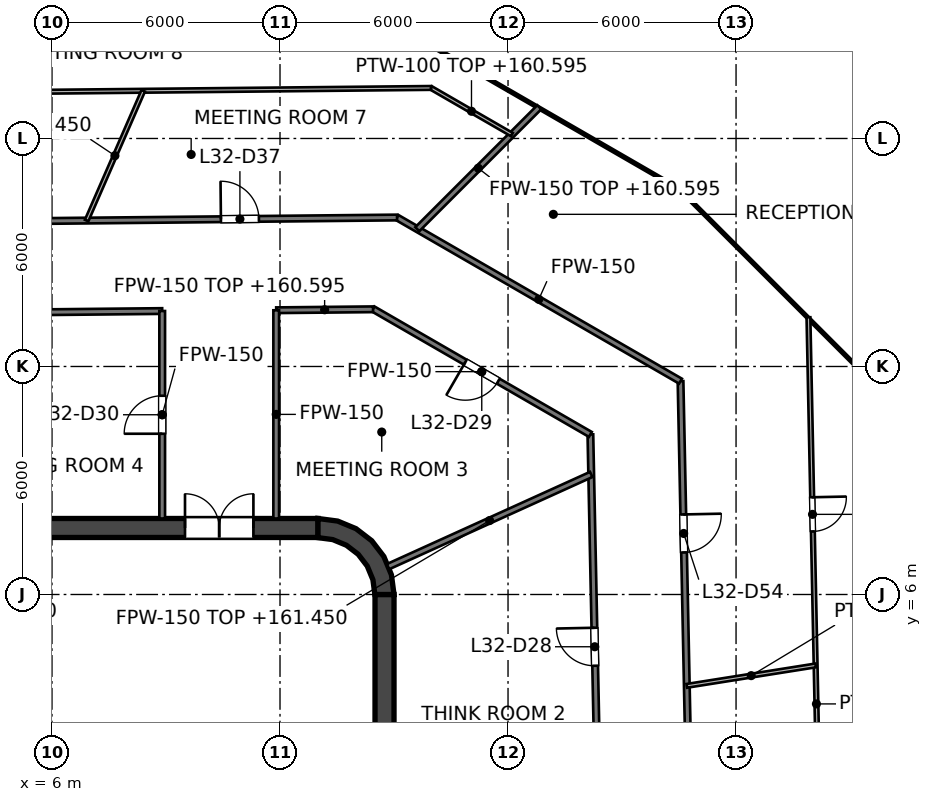
"""IFC4 building model, lengths in metres.
Left out: names, types, materials, properties, quantities, classifications, styles, units other than length and angle.
Written with IfcOpenShell. Run it as: python <this file> out.ifc"""

import sys

from ifc_helpers import new_model, si_unit, direction, frame, frame_2d, origin, place, context, subcontext, project, spatial, polyline, rectangle, outline, extrude, element, fill, save


model = new_model("IFC4")
c1 = context("Model", 3, precision=1e-05, world=origin(), true_north=direction((0.0, 1.0)))
c2 = subcontext(c1, "Body", "Model", "MODEL_VIEW")
j1 = project(units=[si_unit("LENGTHUNIT", "METRE"), si_unit("PLANEANGLEUNIT", "RADIAN")], contexts=[c1])
p1 = place(None, origin())
s1 = spatial("IfcSite", under=j1, at=p1, CompositionType="ELEMENT")
p2 = place(p1, origin())
s2 = spatial("IfcBuilding", under=s1, at=p2, CompositionType="ELEMENT")
p3 = place(p2, frame((0.0, 0.0, 157.6)))
s3 = spatial("IfcBuildingStorey", under=s2, at=p3, CompositionType="ELEMENT", Elevation=157.6)
p4 = place(p3, frame((-13.0, 7.75, 0.0), z_axis=(0.0, 0.0, 1.0), x_axis=(1.0, 0.0, 0.0)))
e1 = element("IfcWall", 1, at=p4, inside=s3, PredefinedType="SHEAR", context=c2, shape_type="SweptSolid", body=[
    extrude(rectangle(XDim=26.0, YDim=0.5, at=frame_2d((13.0, 0.0))), origin(), (0.0, 0.0, 1.0), 4.0),
])
p5 = place(p4, frame((1.7, 0.0, 0.0)))
e2 = element("IfcOpeningElement", 2, at=p5, cuts=e1, PredefinedType="OPENING", context=c2, shape_type="SweptSolid", body=[
    extrude(rectangle(XDim=1.8, YDim=2.1, at=frame_2d((0.9, 1.05))), frame((0.0, 0.25, 0.0), z_axis=(0.0, -1.0, 0.0), x_axis=(1.0, 0.0, 0.0)), (0.0, 0.0, 1.0), 0.5),
])
p6 = place(p4, frame((22.5, 0.0, 0.0)))
e3 = element("IfcOpeningElement", 3, at=p6, cuts=e1, PredefinedType="OPENING", context=c2, shape_type="SweptSolid", body=[
    extrude(rectangle(XDim=1.8, YDim=2.1, at=frame_2d((0.9, 1.05))), frame((0.0, 0.25, 0.0), z_axis=(0.0, -1.0, 0.0), x_axis=(1.0, 0.0, 0.0)), (0.0, 0.0, 1.0), 0.5),
])
p7 = place(p3, frame((14.75, -6.0, 0.0), z_axis=(0.0, 0.0, 1.0), x_axis=(0.0, 1.0, 0.0)))
e4 = element("IfcWall", 4, at=p7, inside=s3, PredefinedType="SHEAR", context=c2, shape_type="SweptSolid", body=[
    extrude(rectangle(XDim=12.0, YDim=0.5, at=frame_2d((6.0, 0.0))), origin(), (0.0, 0.0, 1.0), 4.0),
])
p8 = place(p3, origin())
e5 = element("IfcWall", 5, at=p8, inside=s3, PredefinedType="SHEAR", context=c2, shape_type="SweptSolid", body=[
    extrude(outline(polyline([(13.0, 8.0), (13.0, 7.496), (13.387, 7.445), (13.748, 7.295), (14.058, 7.058), (14.295, 6.748), (14.445, 6.387), (14.496, 6.0), (15.0, 6.0), (14.932, 6.518), (14.732, 7.0), (14.414, 7.414), (14.0, 7.732), (13.518, 7.932), (13.0, 8.0)])), origin(), (0.0, 0.0, 1.0), 4.0),
])
p9 = place(p3, frame((9.0, 4.1, 0.0), z_axis=(0.0, 0.0, 1.0), x_axis=(0.0, 1.0, 0.0)))
e6 = element("IfcWall", 6, at=p9, inside=s3, PredefinedType="SOLIDWALL", context=c2, shape_type="SweptSolid", body=[
    extrude(rectangle(XDim=2.5, YDim=0.25, at=frame_2d((1.25, 0.0))), origin(), (0.0, 0.0, 1.0), 3.85),
])
p10 = place(p9, frame((0.65, 0.0, 0.0)))
e7 = element("IfcOpeningElement", 7, at=p10, cuts=e6, PredefinedType="OPENING", context=c2, shape_type="SweptSolid", body=[
    extrude(rectangle(XDim=1.2, YDim=2.1, at=frame_2d((0.6, 1.05))), frame((0.0, 0.125, 0.0), z_axis=(0.0, -1.0, 0.0), x_axis=(1.0, 0.0, 0.0)), (0.0, 0.0, 1.0), 0.25),
])
p11 = place(p3, frame((-9.125, 7.05, 0.0), z_axis=(0.0, 0.0, 1.0), x_axis=(1.0, 0.0, 0.0)))
e8 = element("IfcWall", 8, at=p11, inside=s3, PredefinedType="SOLIDWALL", context=c2, shape_type="SweptSolid", body=[
    extrude(rectangle(XDim=18.25, YDim=0.9, at=frame_2d((9.125, 0.0))), origin(), (0.0, 0.0, 1.0), 3.85),
])
p12 = place(p3, frame((0.775, 3.975, 0.0), z_axis=(0.0, 0.0, 1.0), x_axis=(1.0, 0.0, 0.0)))
e9 = element("IfcWall", 9, at=p12, inside=s3, PredefinedType="SOLIDWALL", context=c2, shape_type="SweptSolid", body=[
    extrude(rectangle(XDim=8.35, YDim=0.25, at=frame_2d((4.175, 0.0))), origin(), (0.0, 0.0, 1.0), 3.85),
])
p13 = place(p3, frame((9.0, 1.65, 0.0), z_axis=(0.0, 0.0, 1.0), x_axis=(0.0, 1.0, 0.0)))
e10 = element("IfcWall", 10, at=p13, inside=s3, PredefinedType="PARTITIONING", context=c2, shape_type="SweptSolid", body=[
    extrude(rectangle(XDim=2.2, YDim=0.25, at=frame_2d((1.1, 0.0))), origin(), (0.0, 0.0, 1.0), 3.85),
])
p14 = place(p3, frame((11.8, -7.5, 0.0), z_axis=(0.0, 0.0, 1.0), x_axis=(0.0, 1.0, 0.0)))
e11 = element("IfcWall", 11, at=p14, inside=s3, PredefinedType="SOLIDWALL", context=c2, shape_type="SweptSolid", body=[
    extrude(rectangle(XDim=15.0, YDim=0.4, at=frame_2d((7.5, 0.0))), origin(), (0.0, 0.0, 1.0), 3.85),
])
p15 = place(p14, frame((11.3, 0.0, 0.0)))
e12 = element("IfcOpeningElement", 12, at=p15, cuts=e11, PredefinedType="OPENING", context=c2, shape_type="SweptSolid", body=[
    extrude(rectangle(XDim=1.1, YDim=2.1, at=frame_2d((0.55, 1.05))), frame((0.0, 0.2, 0.0), z_axis=(0.0, -1.0, 0.0), x_axis=(1.0, 0.0, 0.0)), (0.0, 0.0, 1.0), 0.4),
])
p16 = place(p14, frame((8.4, 0.0, 0.0)))
e13 = element("IfcOpeningElement", 13, at=p16, cuts=e11, PredefinedType="OPENING", context=c2, shape_type="SweptSolid", body=[
    extrude(rectangle(XDim=1.1, YDim=2.1, at=frame_2d((0.55, 1.05))), frame((0.0, 0.2, 0.0), z_axis=(0.0, -1.0, 0.0), x_axis=(1.0, 0.0, 0.0)), (0.0, 0.0, 1.0), 0.4),
])
p17 = place(p14, frame((5.5, 0.0, 0.0)))
e14 = element("IfcOpeningElement", 14, at=p17, cuts=e11, PredefinedType="OPENING", context=c2, shape_type="SweptSolid", body=[
    extrude(rectangle(XDim=1.1, YDim=2.1, at=frame_2d((0.55, 1.05))), frame((0.0, 0.2, 0.0), z_axis=(0.0, -1.0, 0.0), x_axis=(1.0, 0.0, 0.0)), (0.0, 0.0, 1.0), 0.4),
])
p18 = place(p14, frame((13.697, 0.0, 0.0)))
e15 = element("IfcOpeningElement", 15, at=p18, cuts=e11, PredefinedType="OPENING", context=c2, shape_type="SweptSolid", body=[
    extrude(rectangle(XDim=0.9, YDim=2.1, at=frame_2d((0.45, 1.05))), frame((0.0, 0.2, 0.0), z_axis=(0.0, -1.0, 0.0), x_axis=(1.0, 0.0, 0.0)), (0.0, 0.0, 1.0), 0.4),
])
p19 = place(p14, frame((0.403, 0.0, 0.0)))
e16 = element("IfcOpeningElement", 16, at=p19, cuts=e11, PredefinedType="OPENING", context=c2, shape_type="SweptSolid", body=[
    extrude(rectangle(XDim=0.9, YDim=2.1, at=frame_2d((0.45, 1.05))), frame((0.0, 0.2, 0.0), z_axis=(0.0, -1.0, 0.0), x_axis=(1.0, 0.0, 0.0)), (0.0, 0.0, 1.0), 0.4),
])
e17 = element("IfcWall", 17, at=p8, inside=s3, PredefinedType="SOLIDWALL", context=c2, shape_type="SweptSolid", body=[
    extrude(outline(polyline([(12.0, -5.675), (12.0, -5.925), (14.25, -5.925), (14.5, -5.925), (14.5, -5.675), (14.5, -3.025), (14.5, -2.775), (14.5, -0.125), (14.5, 0.125), (14.5, 2.775), (14.5, 3.025), (14.5, 5.675), (14.5, 5.925), (14.25, 5.925), (12.0, 5.925), (12.0, 5.675), (14.25, 5.675), (14.25, 3.025), (12.0, 3.025), (12.0, 2.775), (14.25, 2.775), (14.25, 0.125), (12.0, 0.125), (12.0, -0.125), (14.25, -0.125), (14.25, -2.775), (12.0, -2.775), (12.0, -3.025), (14.25, -3.025), (14.25, -5.675), (12.0, -5.675)])), origin(), (0.0, 0.0, 1.0), 3.85),
])
p20 = place(p3, frame((20.167, 10.213, 0.0), z_axis=(0.0, 0.0, 1.0), x_axis=(0.020610894613, -0.999787572949, 0.0)))
e18 = element("IfcWall", 18, at=p20, inside=s3, PredefinedType="PARTITIONING", context=c2, shape_type="SweptSolid", body=[
    extrude(rectangle(XDim=17.637, YDim=0.15, at=frame_2d((8.819, 0.0))), origin(), (0.0, 0.0, 1.0), 2.927),
])
p21 = place(p20, frame((10.508, 0.0, 0.0)))
e19 = element("IfcOpeningElement", 19, at=p21, cuts=e18, PredefinedType="OPENING", context=c2, shape_type="SweptSolid", body=[
    extrude(rectangle(XDim=1.0, YDim=2.1, at=frame_2d((0.5, 1.05))), frame((0.0, 0.075, 0.0), z_axis=(0.0, -1.0, 0.0), x_axis=(1.0, 0.0, 0.0)), (0.0, 0.0, 1.0), 0.15),
])
p22 = place(p20, frame((5.09, 0.0, 0.0)))
e20 = element("IfcOpeningElement", 20, at=p22, cuts=e18, PredefinedType="OPENING", context=c2, shape_type="SweptSolid", body=[
    extrude(rectangle(XDim=1.0, YDim=2.1, at=frame_2d((0.5, 1.05))), frame((0.0, 0.075, 0.0), z_axis=(0.0, -1.0, 0.0), x_axis=(1.0, 0.0, 0.0)), (0.0, 0.0, 1.0), 0.15),
])
p23 = place(p3, frame((22.539, 11.615, 0.0), z_axis=(0.0, 0.0, 1.0), x_axis=(0.020601506683, -0.99978776644, 0.0)))
e21 = element("IfcWall", 21, at=p23, inside=s3, PredefinedType="PARTITIONING", context=c2, shape_type="SweptSolid", body=[
    extrude(rectangle(XDim=19.66, YDim=0.15, at=frame_2d((9.83, 0.0))), origin(), (0.0, 0.0, 1.0), 2.927),
])
p24 = place(p23, frame((13.341, 0.0, 0.0)))
e22 = element("IfcOpeningElement", 22, at=p24, cuts=e21, PredefinedType="OPENING", context=c2, shape_type="SweptSolid", body=[
    extrude(rectangle(XDim=1.0, YDim=2.1, at=frame_2d((0.5, 1.05))), frame((0.0, 0.075, 0.0), z_axis=(0.0, -1.0, 0.0), x_axis=(1.0, 0.0, 0.0)), (0.0, 0.0, 1.0), 0.15),
])
p25 = place(p23, frame((3.51, 0.0, 0.0)))
e23 = element("IfcOpeningElement", 23, at=p25, cuts=e21, PredefinedType="OPENING", context=c2, shape_type="SweptSolid", body=[
    extrude(rectangle(XDim=1.0, YDim=2.1, at=frame_2d((0.5, 1.05))), frame((0.0, 0.075, 0.0), z_axis=(0.0, -1.0, 0.0), x_axis=(1.0, 0.0, 0.0)), (0.0, 0.0, 1.0), 0.15),
])
p26 = place(p3, frame((14.448, 13.515, 0.0), z_axis=(0.0, 0.0, 1.0), x_axis=(0.865975016585, -0.500087263036, 0.0)))
e24 = element("IfcWall", 24, at=p26, inside=s3, PredefinedType="PARTITIONING", context=c2, shape_type="SweptSolid", body=[
    extrude(rectangle(XDim=6.604, YDim=0.15, at=frame_2d((3.302, 0.0))), origin(), (0.0, 0.0, 1.0), 2.927),
])
p27 = place(p26, frame((2.804, 0.0, 0.0)))
e25 = element("IfcOpeningElement", 25, at=p27, cuts=e24, PredefinedType="OPENING", context=c2, shape_type="SweptSolid", body=[
    extrude(rectangle(XDim=1.0, YDim=2.1, at=frame_2d((0.5, 1.05))), frame((0.0, 0.075, 0.0), z_axis=(0.0, -1.0, 0.0), x_axis=(1.0, 0.0, 0.0)), (0.0, 0.0, 1.0), 0.15),
])
p28 = place(p3, frame((15.08, 15.921, 0.0), z_axis=(0.0, 0.0, 1.0), x_axis=(0.865982112089, -0.50007497592, 0.0)))
e26 = element("IfcWall", 26, at=p28, inside=s3, PredefinedType="PARTITIONING", context=c2, shape_type="SweptSolid", body=[
    extrude(rectangle(XDim=8.613, YDim=0.15, at=frame_2d((4.306, 0.0))), origin(), (0.0, 0.0, 1.0), 2.927),
])
p29 = place(p3, frame((-8.9, 13.282, 0.0), z_axis=(0.0, 0.0, 1.0), x_axis=(0.999950834077, 0.009916119672, 0.0)))
e27 = element("IfcWall", 27, at=p29, inside=s3, PredefinedType="PARTITIONING", context=c2, shape_type="SweptSolid", body=[
    extrude(rectangle(XDim=17.801, YDim=0.15, at=frame_2d((8.9, 0.0))), origin(), (0.0, 0.0, 1.0), 2.927),
])
p30 = place(p29, frame((8.412, 0.0, 0.0)))
e28 = element("IfcOpeningElement", 28, at=p30, cuts=e27, PredefinedType="OPENING", context=c2, shape_type="SweptSolid", body=[
    extrude(rectangle(XDim=1.0, YDim=2.1, at=frame_2d((0.5, 1.05))), frame((0.0, 0.075, 0.0), z_axis=(0.0, -1.0, 0.0), x_axis=(1.0, 0.0, 0.0)), (0.0, 0.0, 1.0), 0.15),
])
p31 = place(p3, frame((11.9, 13.48, 0.0), z_axis=(0.0, 0.0, 1.0), x_axis=(0.999950357576, 0.009964054536, 0.0)))
e29 = element("IfcWall", 29, at=p31, inside=s3, PredefinedType="PARTITIONING", context=c2, shape_type="SweptSolid", body=[
    extrude(rectangle(XDim=2.548, YDim=0.15, at=frame_2d((1.274, 0.0))), origin(), (0.0, 0.0, 1.0), 2.995),
])
p32 = place(p3, frame((-18.587, 15.587, 0.0), z_axis=(0.0, 0.0, 1.0), x_axis=(0.99995087003, 0.009912493396, 0.0)))
e30 = element("IfcWall", 30, at=p32, inside=s3, PredefinedType="PARTITIONING", context=c2, shape_type="SweptSolid", body=[
    extrude(rectangle(XDim=33.669, YDim=0.15, at=frame_2d((16.834, 0.0))), origin(), (0.0, 0.0, 1.0), 2.927),
])
p33 = place(p32, frame((29.033, 0.0, 0.0)))
e31 = element("IfcOpeningElement", 31, at=p33, cuts=e30, PredefinedType="OPENING", context=c2, shape_type="SweptSolid", body=[
    extrude(rectangle(XDim=1.0, YDim=2.1, at=frame_2d((0.5, 1.05))), frame((0.0, 0.075, 0.0), z_axis=(0.0, -1.0, 0.0), x_axis=(1.0, 0.0, 0.0)), (0.0, 0.0, 1.0), 0.15),
])
p34 = place(p32, frame((21.787, 0.0, 0.0)))
e32 = element("IfcOpeningElement", 32, at=p34, cuts=e30, PredefinedType="OPENING", context=c2, shape_type="SweptSolid", body=[
    extrude(rectangle(XDim=1.0, YDim=2.1, at=frame_2d((0.5, 1.05))), frame((0.0, 0.075, 0.0), z_axis=(0.0, -1.0, 0.0), x_axis=(1.0, 0.0, 0.0)), (0.0, 0.0, 1.0), 0.15),
])
p35 = place(p32, frame((16.335, 0.0, 0.0)))
e33 = element("IfcOpeningElement", 33, at=p35, cuts=e30, PredefinedType="OPENING", context=c2, shape_type="SweptSolid", body=[
    extrude(rectangle(XDim=1.0, YDim=2.1, at=frame_2d((0.5, 1.05))), frame((0.0, 0.075, 0.0), z_axis=(0.0, -1.0, 0.0), x_axis=(1.0, 0.0, 0.0)), (0.0, 0.0, 1.0), 0.15),
])
p36 = place(p32, frame((4.217, 0.0, 0.0)))
e34 = element("IfcOpeningElement", 34, at=p36, cuts=e30, PredefinedType="OPENING", context=c2, shape_type="SweptSolid", body=[
    extrude(rectangle(XDim=1.0, YDim=2.1, at=frame_2d((0.5, 1.05))), frame((0.0, 0.075, 0.0), z_axis=(0.0, -1.0, 0.0), x_axis=(1.0, 0.0, 0.0)), (0.0, 0.0, 1.0), 0.15),
])
p37 = place(p3, frame((14.843, 6.733, 0.0), z_axis=(0.0, 0.0, 1.0), x_axis=(0.910628361306, 0.413226315214, 0.0)))
e35 = element("IfcWall", 35, at=p37, inside=s3, PredefinedType="PARTITIONING", context=c2, shape_type="SweptSolid", body=[
    extrude(rectangle(XDim=5.87, YDim=0.15, at=frame_2d((2.935, 0.0))), origin(), (0.0, 0.0, 1.0), 3.85),
])
p38 = place(p3, frame((15.613, 15.613, 0.0), z_axis=(0.0, 0.0, 1.0), x_axis=(0.707106781187, 0.707106781187, 0.0)))
e36 = element("IfcWall", 36, at=p38, inside=s3, PredefinedType="PARTITIONING", context=c2, shape_type="SweptSolid", body=[
    extrude(rectangle(XDim=4.538, YDim=0.15, at=frame_2d((2.269, 0.0))), origin(), (0.0, 0.0, 1.0), 2.995),
])
p39 = place(p3, frame((11.9, 8.0, 0.0), z_axis=(0.0, 0.0, 1.0), x_axis=(0.0, 1.0, 0.0)))
e37 = element("IfcWall", 37, at=p39, inside=s3, PredefinedType="PARTITIONING", context=c2, shape_type="SweptSolid", body=[
    extrude(rectangle(XDim=5.479, YDim=0.15, at=frame_2d((2.74, 0.0))), origin(), (0.0, 0.0, 1.0), 2.927),
])
p40 = place(p3, frame((8.9, 8.0, 0.0), z_axis=(0.0, 0.0, 1.0), x_axis=(0.0, 1.0, 0.0)))
e38 = element("IfcWall", 38, at=p40, inside=s3, PredefinedType="PARTITIONING", context=c2, shape_type="SweptSolid", body=[
    extrude(rectangle(XDim=5.46, YDim=0.15, at=frame_2d((2.73, 0.0))), origin(), (0.0, 0.0, 1.0), 2.927),
])
p41 = place(p40, frame((2.23, 0.0, 0.0)))
e39 = element("IfcOpeningElement", 39, at=p41, cuts=e38, PredefinedType="OPENING", context=c2, shape_type="SweptSolid", body=[
    extrude(rectangle(XDim=1.0, YDim=2.1, at=frame_2d((0.5, 1.05))), frame((0.0, 0.075, 0.0), z_axis=(0.0, -1.0, 0.0), x_axis=(1.0, 0.0, 0.0)), (0.0, 0.0, 1.0), 0.15),
])
p42 = place(p3, frame((25.905, 13.295, 0.0), z_axis=(0.0, 0.0, 1.0), x_axis=(0.020631727872, -0.999787143249, 0.0)))
e40 = element("IfcWall", 40, at=p42, inside=s3, PredefinedType="PARTITIONING", context=c2, shape_type="SweptSolid", body=[
    extrude(rectangle(XDim=20.353, YDim=0.1, at=frame_2d((10.177, 0.0))), origin(), (0.0, 0.0, 1.0), 2.927),
])
p43 = place(p42, frame((4.737, 0.0, 0.0)))
e41 = element("IfcOpeningElement", 41, at=p43, cuts=e40, PredefinedType="OPENING", context=c2, shape_type="SweptSolid", body=[
    extrude(rectangle(XDim=0.9, YDim=2.1, at=frame_2d((0.45, 1.05))), frame((0.0, 0.05, 0.0), z_axis=(0.0, -1.0, 0.0), x_axis=(1.0, 0.0, 0.0)), (0.0, 0.0, 1.0), 0.1),
])
p44 = place(p3, frame((15.975, 19.33, 0.0), z_axis=(0.0, 0.0, 1.0), x_axis=(0.865977001312, -0.500083826171, 0.0)))
e42 = element("IfcWall", 42, at=p44, inside=s3, PredefinedType="PARTITIONING", context=c2, shape_type="SweptSolid", body=[
    extrude(rectangle(XDim=2.456, YDim=0.1, at=frame_2d((1.228, 0.0))), origin(), (0.0, 0.0, 1.0), 2.995),
])
p45 = place(p3, frame((-11.006, 19.063, 0.0), z_axis=(0.0, 0.0, 1.0), x_axis=(0.999951007424, 0.009898623735, 0.0)))
e43 = element("IfcWall", 43, at=p45, inside=s3, PredefinedType="PARTITIONING", context=c2, shape_type="SweptSolid", body=[
    extrude(rectangle(XDim=26.982, YDim=0.1, at=frame_2d((13.491, 0.0))), origin(), (0.0, 0.0, 1.0), 2.927),
])
p46 = place(p45, frame((5.412, 0.0, 0.0)))
e44 = element("IfcOpeningElement", 44, at=p46, cuts=e43, PredefinedType="OPENING", context=c2, shape_type="SweptSolid", body=[
    extrude(rectangle(XDim=0.9, YDim=2.1, at=frame_2d((0.45, 1.05))), frame((0.0, 0.05, 0.0), z_axis=(0.0, -1.0, 0.0), x_axis=(1.0, 0.0, 0.0)), (0.0, 0.0, 1.0), 0.1),
])
p47 = place(p3, frame((22.704, 3.596, 0.0), z_axis=(0.0, 0.0, 1.0), x_axis=(0.987679194201, 0.156492202178, 0.0)))
e45 = element("IfcWall", 45, at=p47, inside=s3, PredefinedType="PARTITIONING", context=c2, shape_type="SweptSolid", body=[
    extrude(rectangle(XDim=3.432, YDim=0.1, at=frame_2d((1.716, 0.0))), origin(), (0.0, 0.0, 1.0), 2.995),
])
p48 = place(p3, frame((6.911, 15.84, 0.0), z_axis=(0.0, 0.0, 1.0), x_axis=(0.39992143624, 0.916549423019, 0.0)))
e46 = element("IfcWall", 46, at=p48, inside=s3, PredefinedType="PARTITIONING", context=c2, shape_type="SweptSolid", body=[
    extrude(rectangle(XDim=3.726, YDim=0.1, at=frame_2d((1.863, 0.0))), origin(), (0.0, 0.0, 1.0), 3.85),
])
p49 = place(p15, origin())
e47 = element("IfcDoor", 47, at=p49, inside=s3, OperationType="DOUBLE_DOOR_SLIDING", PredefinedType="DOOR", context=c2, shape_type="SweptSolid", body=[
    extrude(rectangle(XDim=1.1, YDim=2.1, at=frame_2d((0.55, 1.05))), frame((0.0, 0.025, 0.0), z_axis=(0.0, -1.0, 0.0), x_axis=(1.0, 0.0, 0.0)), (0.0, 0.0, 1.0), 0.05),
])
fill(e12, e47)
p50 = place(p10, origin())
e48 = element("IfcDoor", 48, at=p50, inside=s3, OperationType="SINGLE_SWING_LEFT", PredefinedType="DOOR", context=c2, shape_type="SweptSolid", body=[
    extrude(rectangle(XDim=1.2, YDim=2.1, at=frame_2d((0.6, 1.05))), frame((0.0, 0.025, 0.0), z_axis=(0.0, -1.0, 0.0), x_axis=(1.0, 0.0, 0.0)), (0.0, 0.0, 1.0), 0.05),
])
fill(e7, e48)
p51 = place(p18, origin())
e49 = element("IfcDoor", 49, at=p51, inside=s3, OperationType="SINGLE_SWING_RIGHT", PredefinedType="DOOR", context=c2, shape_type="SweptSolid", body=[
    extrude(rectangle(XDim=0.9, YDim=2.1, at=frame_2d((0.45, 1.05))), frame((0.0, 0.025, 0.0), z_axis=(0.0, -1.0, 0.0), x_axis=(1.0, 0.0, 0.0)), (0.0, 0.0, 1.0), 0.05),
])
fill(e15, e49)
p52 = place(p6, origin())
e50 = element("IfcDoor", 50, at=p52, inside=s3, OperationType="DOUBLE_DOOR_SINGLE_SWING", PredefinedType="DOOR", context=c2, shape_type="SweptSolid", body=[
    extrude(rectangle(XDim=1.8, YDim=2.1, at=frame_2d((0.9, 1.05))), frame((0.0, 0.025, 0.0), z_axis=(0.0, -1.0, 0.0), x_axis=(1.0, 0.0, 0.0)), (0.0, 0.0, 1.0), 0.05),
])
fill(e3, e50)
p53 = place(p22, origin())
e51 = element("IfcDoor", 51, at=p53, inside=s3, OperationType="SINGLE_SWING_LEFT", PredefinedType="DOOR", context=c2, shape_type="SweptSolid", body=[
    extrude(rectangle(XDim=1.0, YDim=2.1, at=frame_2d((0.5, 1.05))), frame((0.0, 0.025, 0.0), z_axis=(0.0, -1.0, 0.0), x_axis=(1.0, 0.0, 0.0)), (0.0, 0.0, 1.0), 0.05),
])
fill(e20, e51)
p54 = place(p27, origin())
e52 = element("IfcDoor", 52, at=p54, inside=s3, OperationType="SINGLE_SWING_LEFT", PredefinedType="DOOR", context=c2, shape_type="SweptSolid", body=[
    extrude(rectangle(XDim=1.0, YDim=2.1, at=frame_2d((0.5, 1.05))), frame((0.0, 0.025, 0.0), z_axis=(0.0, -1.0, 0.0), x_axis=(1.0, 0.0, 0.0)), (0.0, 0.0, 1.0), 0.05),
])
fill(e25, e52)
p55 = place(p41, origin())
e53 = element("IfcDoor", 53, at=p55, inside=s3, OperationType="SINGLE_SWING_LEFT", PredefinedType="DOOR", context=c2, shape_type="SweptSolid", body=[
    extrude(rectangle(XDim=1.0, YDim=2.1, at=frame_2d((0.5, 1.05))), frame((0.0, 0.025, 0.0), z_axis=(0.0, -1.0, 0.0), x_axis=(1.0, 0.0, 0.0)), (0.0, 0.0, 1.0), 0.05),
])
fill(e39, e53)
p56 = place(p33, origin())
e54 = element("IfcDoor", 54, at=p56, inside=s3, OperationType="SINGLE_SWING_LEFT", PredefinedType="DOOR", context=c2, shape_type="SweptSolid", body=[
    extrude(rectangle(XDim=1.0, YDim=2.1, at=frame_2d((0.5, 1.05))), frame((0.0, 0.025, 0.0), z_axis=(0.0, -1.0, 0.0), x_axis=(1.0, 0.0, 0.0)), (0.0, 0.0, 1.0), 0.05),
])
fill(e31, e54)
p57 = place(p25, origin())
e55 = element("IfcDoor", 55, at=p57, inside=s3, OperationType="SINGLE_SWING_LEFT", PredefinedType="DOOR", context=c2, shape_type="SweptSolid", body=[
    extrude(rectangle(XDim=1.0, YDim=2.1, at=frame_2d((0.5, 1.05))), frame((0.0, 0.025, 0.0), z_axis=(0.0, -1.0, 0.0), x_axis=(1.0, 0.0, 0.0)), (0.0, 0.0, 1.0), 0.05),
])
fill(e23, e55)
p58 = place(p43, origin())
e56 = element("IfcDoor", 56, at=p58, inside=s3, OperationType="SINGLE_SWING_LEFT", PredefinedType="DOOR", context=c2, shape_type="SweptSolid", body=[
    extrude(rectangle(XDim=0.9, YDim=2.1, at=frame_2d((0.45, 1.05))), frame((0.0, 0.025, 0.0), z_axis=(0.0, -1.0, 0.0), x_axis=(1.0, 0.0, 0.0)), (0.0, 0.0, 1.0), 0.05),
])
fill(e41, e56)
save(model, sys.argv[1])
